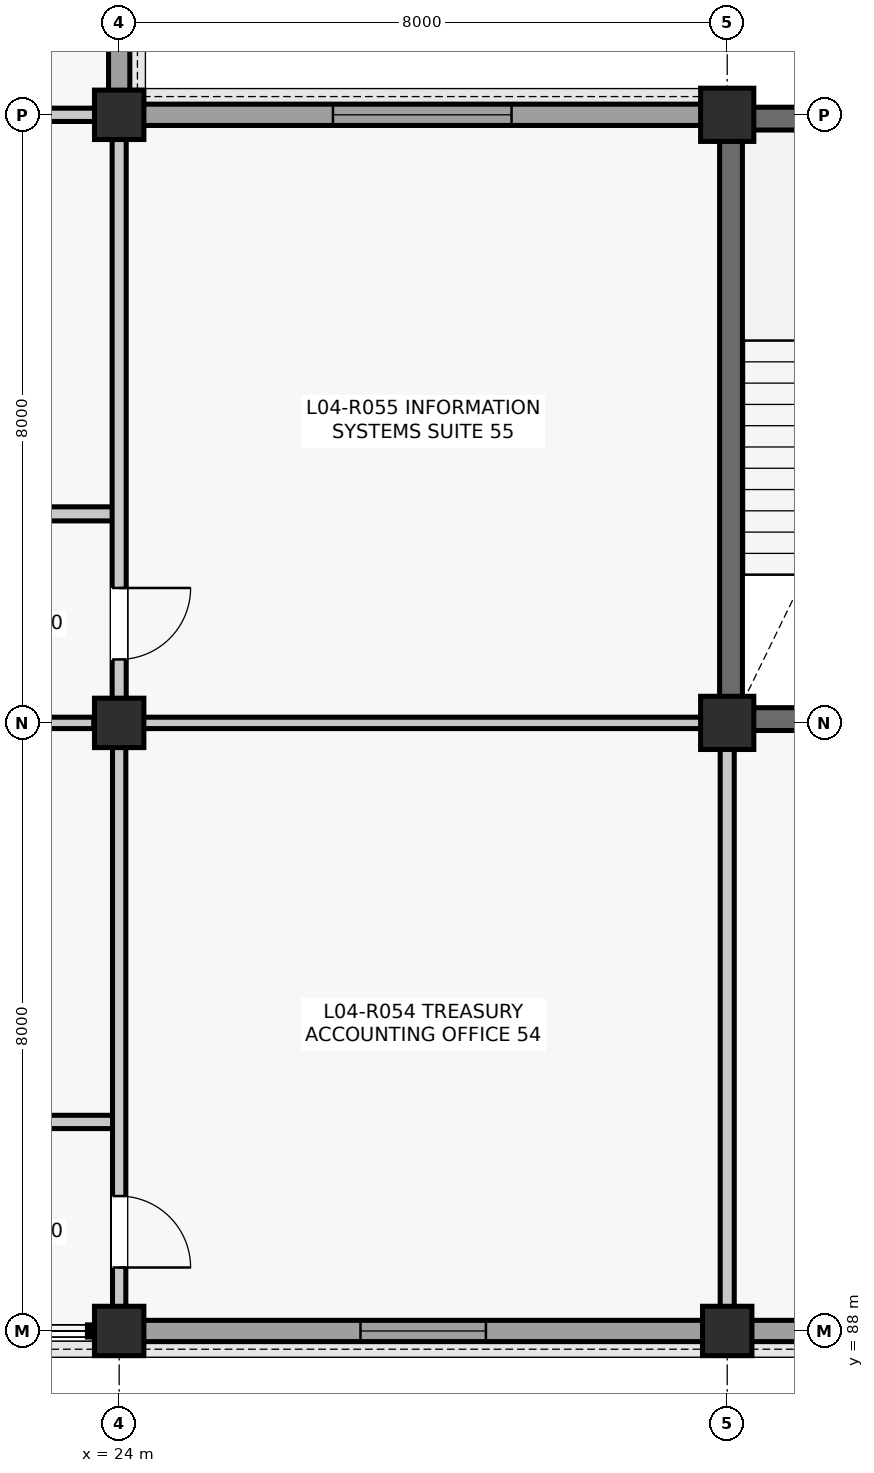
"""IFC4 building model, lengths in metres.
Left out: names, types, materials, properties, quantities, classifications, styles, units other than length and angle.
Written with IfcOpenShell. Run it as: python <this file> out.ifc"""

import sys

from ifc_helpers import new_model, si_unit, direction, frame, frame_2d, origin, origin_2d, place, context, subcontext, project, spatial, rectangle, extrude, element, fill, save


model = new_model("IFC4")
c1 = context("Model", 3, precision=1e-05, world=origin(), true_north=direction((0.0, 1.0)))
c2 = subcontext(c1, "Body", "Model", "MODEL_VIEW")
j1 = project(units=[si_unit("LENGTHUNIT", "METRE"), si_unit("PLANEANGLEUNIT", "RADIAN")], contexts=[c1])
p1 = place(None, origin())
s1 = spatial("IfcSite", under=j1, at=p1, CompositionType="ELEMENT")
p2 = place(p1, origin())
s2 = spatial("IfcBuilding", under=s1, at=p2, CompositionType="ELEMENT")
p3 = place(p2, frame((0.0, 0.0, 17.82)))
s3 = spatial("IfcBuildingStorey", under=s2, at=p3, CompositionType="ELEMENT", Elevation=17.82)
for number, where, z_axis, x_axis in (
    (1, (24.0, 88.0, 0.0), (0.0, 0.0, 1.0), (1.0, 0.0, 0.0)),
    (2, (24.0, 96.0, 0.0), (0.0, 0.0, 1.0), (1.0, 0.0, 0.0)),
    (3, (24.0, 104.0, 0.0), (0.0, 0.0, 1.0), (1.0, 0.0, 0.0)),
    (4, (32.0, 88.0, 0.0), (0.0, 0.0, 1.0), (1.0, 0.0, 0.0)),
):
    element("IfcColumn", number, at=place(p3, frame(where, z_axis=z_axis, x_axis=x_axis)), inside=s3, PredefinedType="COLUMN", context=c2, shape_type="SweptSolid", body=[
        extrude(rectangle(XDim=0.65, YDim=0.65, at=origin_2d()), origin(), (0.0, 0.0, 1.0), 3.96),
    ])
for number, where, z_axis, x_axis in (
    (5, (32.0, 96.0, 0.0), (0.0, 0.0, 1.0), (1.0, 0.0, 0.0)),
    (6, (32.0, 104.0, 0.0), (0.0, 0.0, 1.0), (1.0, 0.0, 0.0)),
):
    element("IfcColumn", number, at=place(p3, frame(where, z_axis=z_axis, x_axis=x_axis)), inside=s3, PredefinedType="COLUMN", context=c2, shape_type="SweptSolid", body=[
        extrude(rectangle(XDim=0.7, YDim=0.7, at=origin_2d()), origin(), (0.0, 0.0, 1.0), 3.96),
    ])
p4 = place(p3, frame((24.0, 104.31, 0.0), z_axis=(0.0, 0.0, 1.0), x_axis=(0.0, 1.0, 0.0)))
e7 = element("IfcWall", 7, at=p4, inside=s3, PredefinedType="SOLIDWALL", context=c2, shape_type="SweptSolid", body=[
    extrude(rectangle(XDim=7.38, YDim=0.28, at=frame_2d((3.69, 0.0))), origin(), (0.0, 0.0, 1.0), 3.285),
])
p5 = place(p4, frame((2.515, 0.0, 0.9)))
e8 = element("IfcOpeningElement", 8, at=p5, cuts=e7, PredefinedType="OPENING", context=c2, shape_type="SweptSolid", body=[
    extrude(rectangle(XDim=2.35, YDim=1.7, at=frame_2d((1.175, 0.85))), frame((0.0, 0.15, 0.0), z_axis=(0.0, -1.0, 0.0), x_axis=(1.0, 0.0, 0.0)), (0.0, 0.0, 1.0), 0.3),
])
p6 = place(p3, frame((24.31, 88.0, 0.0), z_axis=(0.0, 0.0, 1.0), x_axis=(1.0, 0.0, 0.0)))
e9 = element("IfcWall", 9, at=p6, inside=s3, PredefinedType="SOLIDWALL", context=c2, shape_type="SweptSolid", body=[
    extrude(rectangle(XDim=7.38, YDim=0.28, at=frame_2d((3.69, 0.0))), origin(), (0.0, 0.0, 1.0), 3.314),
])
p7 = place(p6, frame((2.865, 0.0, 0.9)))
e10 = element("IfcOpeningElement", 10, at=p7, cuts=e9, PredefinedType="OPENING", context=c2, shape_type="SweptSolid", body=[
    extrude(rectangle(XDim=1.65, YDim=1.75, at=frame_2d((0.825, 0.875))), frame((0.0, 0.15, 0.0), z_axis=(0.0, -1.0, 0.0), x_axis=(1.0, 0.0, 0.0)), (0.0, 0.0, 1.0), 0.3),
])
p8 = place(p3, frame((24.31, 104.0, 0.0), z_axis=(0.0, 0.0, 1.0), x_axis=(1.0, 0.0, 0.0)))
e11 = element("IfcWall", 11, at=p8, inside=s3, PredefinedType="SOLIDWALL", context=c2, shape_type="SweptSolid", body=[
    extrude(rectangle(XDim=7.355, YDim=0.28, at=frame_2d((3.677, 0.0))), origin(), (0.0, 0.0, 1.0), 3.31),
])
p9 = place(p8, frame((2.502, 0.0, 0.9)))
e12 = element("IfcOpeningElement", 12, at=p9, cuts=e11, PredefinedType="OPENING", context=c2, shape_type="SweptSolid", body=[
    extrude(rectangle(XDim=2.35, YDim=1.7, at=frame_2d((1.175, 0.85))), frame((0.0, 0.15, 0.0), z_axis=(0.0, -1.0, 0.0), x_axis=(1.0, 0.0, 0.0)), (0.0, 0.0, 1.0), 0.3),
])
p10 = place(p3, frame((32.31, 88.0, 0.0), z_axis=(0.0, 0.0, 1.0), x_axis=(1.0, 0.0, 0.0)))
e13 = element("IfcWall", 13, at=p10, inside=s3, PredefinedType="SOLIDWALL", context=c2, shape_type="SweptSolid", body=[
    extrude(rectangle(XDim=7.38, YDim=0.28, at=frame_2d((3.69, 0.0))), origin(), (0.0, 0.0, 1.0), 3.377),
])
p11 = place(p10, frame((2.515, 0.0, 0.9)))
e14 = element("IfcOpeningElement", 14, at=p11, cuts=e13, PredefinedType="OPENING", context=c2, shape_type="SweptSolid", body=[
    extrude(rectangle(XDim=2.35, YDim=1.7, at=frame_2d((1.175, 0.85))), frame((0.0, 0.15, 0.0), z_axis=(0.0, -1.0, 0.0), x_axis=(1.0, 0.0, 0.0)), (0.0, 0.0, 1.0), 0.3),
])
p12 = place(p3, frame((32.05, 96.24, 0.0), z_axis=(0.0, 0.0, 1.0), x_axis=(0.0, 1.0, 0.0)))
e15 = element("IfcWall", 15, at=p12, inside=s3, PredefinedType="SHEAR", context=c2, shape_type="SweptSolid", body=[
    extrude(rectangle(XDim=7.52, YDim=0.3, at=frame_2d((3.76, 0.0))), origin(), (0.0, 0.0, 1.0), 3.263),
])
p13 = place(p3, frame((32.24, 103.95, 0.0), z_axis=(0.0, 0.0, 1.0), x_axis=(1.0, 0.0, 0.0)))
e16 = element("IfcWall", 16, at=p13, inside=s3, PredefinedType="SHEAR", context=c2, shape_type="SweptSolid", body=[
    extrude(rectangle(XDim=7.52, YDim=0.3, at=frame_2d((3.76, 0.0))), origin(), (0.0, 0.0, 1.0), 3.367),
])
p14 = place(p3, frame((32.24, 96.05, 0.0), z_axis=(0.0, 0.0, 1.0), x_axis=(1.0, 0.0, 0.0)))
e17 = element("IfcWall", 17, at=p14, inside=s3, PredefinedType="SHEAR", context=c2, shape_type="SweptSolid", body=[
    extrude(rectangle(XDim=3.91, YDim=0.3, at=frame_2d((1.955, 0.0))), origin(), (0.0, 0.0, 1.0), 3.257),
])
p15 = place(p3, frame((18.7, 90.75, 0.0), z_axis=(0.0, 0.0, 1.0), x_axis=(1.0, 0.0, 0.0)))
e18 = element("IfcWall", 18, at=p15, inside=s3, PredefinedType="PARTITIONING", context=c2, shape_type="SweptSolid", body=[
    extrude(rectangle(XDim=5.28, YDim=0.175, at=frame_2d((2.64, 0.0))), origin(), (0.0, 0.0, 1.0), 3.402),
])
p16 = place(p15, frame((2.16, 0.0, 0.0)))
e19 = element("IfcOpeningElement", 19, at=p16, cuts=e18, PredefinedType="OPENING", context=c2, shape_type="SweptSolid", body=[
    extrude(rectangle(XDim=0.96, YDim=2.14, at=frame_2d((0.48, 1.07))), frame((0.0, 0.097, 0.0), z_axis=(0.0, -1.0, 0.0), x_axis=(1.0, 0.0, 0.0)), (0.0, 0.0, 1.0), 0.195),
])
p17 = place(p3, frame((18.75, 96.0, 0.0), z_axis=(0.0, 0.0, 1.0), x_axis=(1.0, 0.0, 0.0)))
e20 = element("IfcWall", 20, at=p17, inside=s3, PredefinedType="PARTITIONING", context=c2, shape_type="SweptSolid", body=[
    extrude(rectangle(XDim=4.915, YDim=0.15, at=frame_2d((2.458, 0.0))), origin(), (0.0, 0.0, 1.0), 3.251),
])
p18 = place(p3, frame((18.7, 98.75, 0.0), z_axis=(0.0, 0.0, 1.0), x_axis=(1.0, 0.0, 0.0)))
e21 = element("IfcWall", 21, at=p18, inside=s3, PredefinedType="PARTITIONING", context=c2, shape_type="SweptSolid", body=[
    extrude(rectangle(XDim=5.28, YDim=0.185, at=frame_2d((2.64, 0.0))), origin(), (0.0, 0.0, 1.0), 3.257),
])
p19 = place(p18, frame((2.08, 0.0, 0.0)))
e22 = element("IfcOpeningElement", 22, at=p19, cuts=e21, PredefinedType="OPENING", context=c2, shape_type="SweptSolid", body=[
    extrude(rectangle(XDim=1.12, YDim=2.22, at=frame_2d((0.56, 1.11))), frame((0.0, 0.103, 0.0), z_axis=(0.0, -1.0, 0.0), x_axis=(1.0, 0.0, 0.0)), (0.0, 0.0, 1.0), 0.205),
])
p20 = place(p3, frame((24.0, 88.315, 0.0), z_axis=(0.0, 0.0, 1.0), x_axis=(0.0, 1.0, 0.0)))
e23 = element("IfcWall", 23, at=p20, inside=s3, PredefinedType="PARTITIONING", context=c2, shape_type="SweptSolid", body=[
    extrude(rectangle(XDim=7.37, YDim=0.175, at=frame_2d((3.685, 0.0))), origin(), (0.0, 0.0, 1.0), 3.462),
])
p21 = place(p20, frame((0.52, 0.0, 0.0)))
e24 = element("IfcOpeningElement", 24, at=p21, cuts=e23, PredefinedType="OPENING", context=c2, shape_type="SweptSolid", body=[
    extrude(rectangle(XDim=0.94, YDim=2.12, at=frame_2d((0.47, 1.06))), frame((0.0, 0.097, 0.0), z_axis=(0.0, -1.0, 0.0), x_axis=(1.0, 0.0, 0.0)), (0.0, 0.0, 1.0), 0.195),
])
p22 = place(p3, frame((24.0, 96.315, 0.0), z_axis=(0.0, 0.0, 1.0), x_axis=(0.0, 1.0, 0.0)))
e25 = element("IfcWall", 25, at=p22, inside=s3, PredefinedType="PARTITIONING", context=c2, shape_type="SweptSolid", body=[
    extrude(rectangle(XDim=7.37, YDim=0.185, at=frame_2d((3.685, 0.0))), origin(), (0.0, 0.0, 1.0), 3.257),
])
p23 = place(p22, frame((0.52, 0.0, 0.0)))
e26 = element("IfcOpeningElement", 26, at=p23, cuts=e25, PredefinedType="OPENING", context=c2, shape_type="SweptSolid", body=[
    extrude(rectangle(XDim=0.94, YDim=2.12, at=frame_2d((0.47, 1.06))), frame((0.0, 0.103, 0.0), z_axis=(0.0, -1.0, 0.0), x_axis=(1.0, 0.0, 0.0)), (0.0, 0.0, 1.0), 0.205),
])
p24 = place(p3, frame((16.315, 104.0, 0.0), z_axis=(0.0, 0.0, 1.0), x_axis=(1.0, 0.0, 0.0)))
e27 = element("IfcWall", 27, at=p24, inside=s3, PredefinedType="PARTITIONING", context=c2, shape_type="SweptSolid", body=[
    extrude(rectangle(XDim=7.37, YDim=0.175, at=frame_2d((3.685, 0.0))), origin(), (0.0, 0.0, 1.0), 3.437),
])
p25 = place(p24, frame((0.52, 0.0, 0.0)))
e28 = element("IfcOpeningElement", 28, at=p25, cuts=e27, PredefinedType="OPENING", context=c2, shape_type="SweptSolid", body=[
    extrude(rectangle(XDim=0.94, YDim=2.12, at=frame_2d((0.47, 1.06))), frame((0.0, 0.097, 0.0), z_axis=(0.0, -1.0, 0.0), x_axis=(1.0, 0.0, 0.0)), (0.0, 0.0, 1.0), 0.195),
])
p26 = place(p3, frame((32.0, 88.315, 0.0), z_axis=(0.0, 0.0, 1.0), x_axis=(0.0, 1.0, 0.0)))
e29 = element("IfcWall", 29, at=p26, inside=s3, PredefinedType="PARTITIONING", context=c2, shape_type="SweptSolid", body=[
    extrude(rectangle(XDim=7.345, YDim=0.185, at=frame_2d((3.672, 0.0))), origin(), (0.0, 0.0, 1.0), 3.257),
])
p27 = place(p3, frame((24.315, 96.0, 0.0), z_axis=(0.0, 0.0, 1.0), x_axis=(1.0, 0.0, 0.0)))
e30 = element("IfcWall", 30, at=p27, inside=s3, PredefinedType="PARTITIONING", context=c2, shape_type="SweptSolid", body=[
    extrude(rectangle(XDim=7.345, YDim=0.15, at=frame_2d((3.672, 0.0))), origin(), (0.0, 0.0, 1.0), 3.462),
])
p28 = place(p7, origin())
e31 = element("IfcWindow", 31, at=p28, inside=s3, PartitioningType="SINGLE_PANEL", PredefinedType="WINDOW", context=c2, shape_type="SweptSolid", body=[
    extrude(rectangle(XDim=1.65, YDim=1.75, at=frame_2d((0.825, 0.875))), frame((0.0, 0.03, 0.0), z_axis=(0.0, -1.0, 0.0), x_axis=(1.0, 0.0, 0.0)), (0.0, 0.0, 1.0), 0.06),
])
fill(e10, e31)
p29 = place(p9, origin())
e32 = element("IfcWindow", 32, at=p29, inside=s3, PartitioningType="SINGLE_PANEL", PredefinedType="WINDOW", context=c2, shape_type="SweptSolid", body=[
    extrude(rectangle(XDim=2.35, YDim=1.7, at=frame_2d((1.175, 0.85))), frame((0.0, 0.03, 0.0), z_axis=(0.0, -1.0, 0.0), x_axis=(1.0, 0.0, 0.0)), (0.0, 0.0, 1.0), 0.06),
])
fill(e12, e32)
p30 = place(p21, frame((0.94, 0.0, 0.0), z_axis=(0.0, 0.0, 1.0), x_axis=(-1.0, 0.0, 0.0)))
e33 = element("IfcDoor", 33, at=p30, inside=s3, OperationType="SINGLE_SWING_LEFT", PredefinedType="DOOR", context=c2, shape_type="SweptSolid", body=[
    extrude(rectangle(XDim=0.94, YDim=2.12, at=frame_2d((0.47, 1.06))), frame((0.0, 0.025, 0.0), z_axis=(0.0, -1.0, 0.0), x_axis=(1.0, 0.0, 0.0)), (0.0, 0.0, 1.0), 0.05),
])
fill(e24, e33)
p31 = place(p23, frame((0.94, 0.0, 0.0), z_axis=(0.0, 0.0, 1.0), x_axis=(-1.0, 0.0, 0.0)))
e34 = element("IfcDoor", 34, at=p31, inside=s3, OperationType="SINGLE_SWING_RIGHT", PredefinedType="DOOR", context=c2, shape_type="SweptSolid", body=[
    extrude(rectangle(XDim=0.94, YDim=2.12, at=frame_2d((0.47, 1.06))), frame((0.0, 0.025, 0.0), z_axis=(0.0, -1.0, 0.0), x_axis=(1.0, 0.0, 0.0)), (0.0, 0.0, 1.0), 0.05),
])
fill(e26, e34)
save(model, sys.argv[1])
